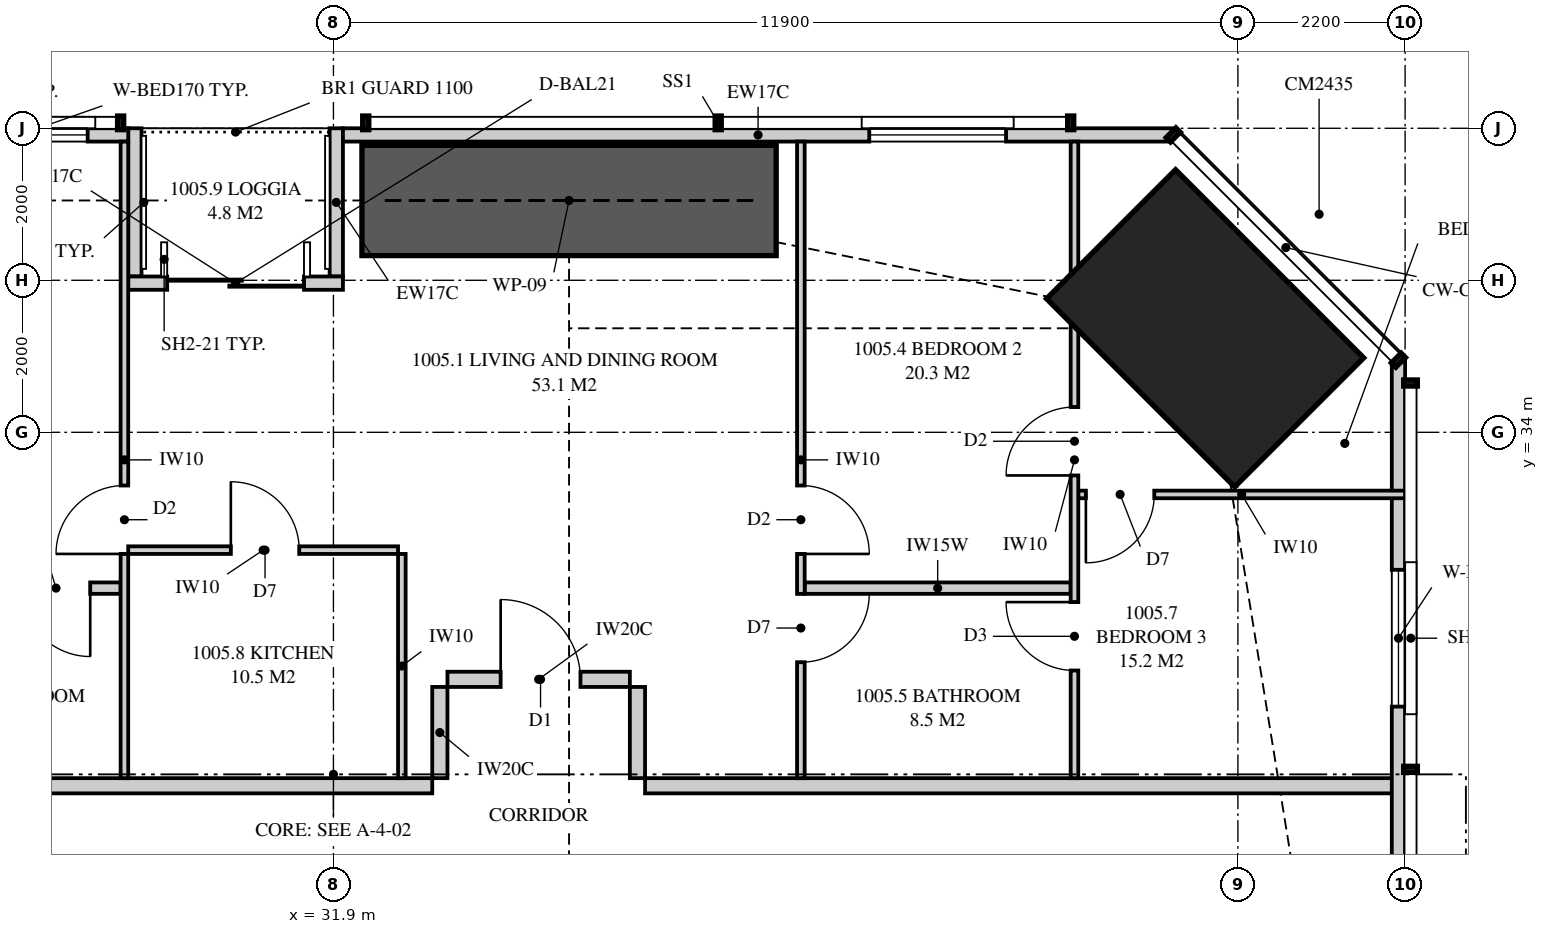
"""IFC4 building model, lengths in metres.
Left out: names, types, materials, properties, quantities, classifications, styles, units other than length and angle.
Written with IfcOpenShell. Run it as: python <this file> out.ifc"""

import sys

from ifc_helpers import new_model, si_unit, direction, frame, frame_2d, origin, origin_2d, place, context, subcontext, project, spatial, polyline, rectangle, outline, extrude, element, fill, save


model = new_model("IFC4")
c1 = context("Model", 3, precision=1e-05, world=origin(), true_north=direction((0.0, 1.0)))
c2 = subcontext(c1, "Body", "Model", "MODEL_VIEW")
j1 = project(units=[si_unit("LENGTHUNIT", "METRE"), si_unit("PLANEANGLEUNIT", "RADIAN")], contexts=[c1])
p1 = place(None, origin())
s1 = spatial("IfcSite", under=j1, at=p1, CompositionType="ELEMENT")
p2 = place(p1, origin())
s2 = spatial("IfcBuilding", under=s1, at=p2, CompositionType="ELEMENT")
p3 = place(p2, frame((0.0, 0.0, 41.1)))
s3 = spatial("IfcBuildingStorey", under=s2, at=p3, CompositionType="ELEMENT", Elevation=41.1)
p4 = place(p3, frame((43.369, 35.369, 0.0), z_axis=(0.0, 0.0, 1.0), x_axis=(-0.707106781187, -0.707106781187, 0.0)))
e1 = element("IfcColumn", 1, at=p4, inside=s3, PredefinedType="COLUMN", context=c2, shape_type="SweptSolid", body=[
    extrude(rectangle(XDim=2.4, YDim=3.5, at=origin_2d()), origin(), (0.0, 0.0, 1.0), 3.35),
])
p5 = place(p3, frame((45.913, 3.051, 0.0), z_axis=(0.0, 0.0, 1.0), x_axis=(0.0, 1.0, 0.0)))
e2 = element("IfcWall", 2, at=p5, inside=s3, PredefinedType="SOLIDWALL", context=c2, shape_type="SweptSolid", body=[
    extrude(outline(polyline([(0.0, 0.0), (31.897, 0.0), (31.897, 3.11), (22.167, 3.11), (22.167, 2.15), (22.074, 2.15), (22.074, 3.11), (21.949, 3.11), (21.949, 2.15), (9.949, 2.15), (9.949, 3.11), (9.823, 3.11), (9.823, 2.15), (9.73, 2.15), (9.73, 3.11), (0.0, 3.11), (0.0, 0.0)])), frame((0.0, 0.087, 0.0), z_axis=(0.0, -1.0, 0.0), x_axis=(1.0, 0.0, 0.0)), (0.0, 0.0, 1.0), 0.175),
])
p6 = place(p5, frame((2.257, 0.0, 0.4)))
e3 = element("IfcOpeningElement", 3, at=p6, cuts=e2, PredefinedType="OPENING", context=c2, shape_type="SweptSolid", body=[
    extrude(rectangle(XDim=1.8, YDim=1.7, at=frame_2d((0.9, 0.85))), frame((0.0, 0.097, 0.0), z_axis=(0.0, -1.0, 0.0), x_axis=(1.0, 0.0, 0.0)), (0.0, 0.0, 1.0), 0.195),
])
p7 = place(p5, frame((14.849, 0.0, 0.4)))
e4 = element("IfcOpeningElement", 4, at=p7, cuts=e2, PredefinedType="OPENING", context=c2, shape_type="SweptSolid", body=[
    extrude(rectangle(XDim=1.2, YDim=1.7, at=frame_2d((0.6, 0.85))), frame((0.0, 0.097, 0.0), z_axis=(0.0, -1.0, 0.0), x_axis=(1.0, 0.0, 0.0)), (0.0, 0.0, 1.0), 0.195),
])
p8 = place(p5, frame((27.34, 0.0, 0.4)))
e5 = element("IfcOpeningElement", 5, at=p8, cuts=e2, PredefinedType="OPENING", context=c2, shape_type="SweptSolid", body=[
    extrude(rectangle(XDim=1.8, YDim=1.7, at=frame_2d((0.9, 0.85))), frame((0.0, 0.097, 0.0), z_axis=(0.0, -1.0, 0.0), x_axis=(1.0, 0.0, 0.0)), (0.0, 0.0, 1.0), 0.195),
])
p9 = place(p3, frame((42.949, 37.913, 0.0), z_axis=(0.0, 0.0, 1.0), x_axis=(-1.0, 0.0, 0.0)))
e6 = element("IfcWall", 6, at=p9, inside=s3, PredefinedType="SOLIDWALL", context=c2, shape_type="SweptSolid", body=[
    extrude(outline(polyline([(0.0, 0.0), (10.924, 0.0), (10.924, 2.15), (7.949, 2.15), (7.949, 3.11), (7.793, 3.11), (7.793, 2.15), (7.745, 2.15), (7.745, 3.11), (0.0, 3.11), (0.0, 0.0)])), frame((0.0, 0.087, 0.0), z_axis=(0.0, -1.0, 0.0), x_axis=(1.0, 0.0, 0.0)), (0.0, 0.0, 1.0), 0.175),
])
p10 = place(p9, frame((2.199, 0.0, 0.4)))
e7 = element("IfcOpeningElement", 7, at=p10, cuts=e6, PredefinedType="OPENING", context=c2, shape_type="SweptSolid", body=[
    extrude(rectangle(XDim=1.8, YDim=1.7, at=frame_2d((0.9, 0.85))), frame((0.0, 0.097, 0.0), z_axis=(0.0, -1.0, 0.0), x_axis=(1.0, 0.0, 0.0)), (0.0, 0.0, 1.0), 0.195),
])
p11 = place(p3, frame((29.2, 37.913, 0.0), z_axis=(0.0, 0.0, 1.0), x_axis=(-1.0, 0.0, 0.0)))
e8 = element("IfcWall", 8, at=p11, inside=s3, PredefinedType="SOLIDWALL", context=c2, shape_type="SweptSolid", body=[
    extrude(rectangle(XDim=8.0, YDim=0.175, at=frame_2d((4.0, 0.0))), origin(), (0.0, 0.0, 1.0), 2.15),
])
p12 = place(p11, frame((0.534, 0.0, 0.4)))
e9 = element("IfcOpeningElement", 9, at=p12, cuts=e8, PredefinedType="OPENING", context=c2, shape_type="SweptSolid", body=[
    extrude(rectangle(XDim=1.8, YDim=1.7, at=frame_2d((0.9, 0.85))), frame((0.0, 0.097, 0.0), z_axis=(0.0, -1.0, 0.0), x_axis=(1.0, 0.0, 0.0)), (0.0, 0.0, 1.0), 0.195),
])
p13 = place(p3, frame((32.025, 35.962, 0.0), z_axis=(0.0, 0.0, 1.0), x_axis=(-1.0, 0.0, 0.0)))
e10 = element("IfcWall", 10, at=p13, inside=s3, PredefinedType="SOLIDWALL", context=c2, shape_type="SweptSolid", body=[
    extrude(rectangle(XDim=2.825, YDim=0.175, at=frame_2d((1.413, 0.0))), origin(), (0.0, 0.0, 1.0), 3.11),
])
p14 = place(p13, frame((0.512, 0.0, 0.0)))
e11 = element("IfcOpeningElement", 11, at=p14, cuts=e10, PredefinedType="OPENING", context=c2, shape_type="SweptSolid", body=[
    extrude(rectangle(XDim=1.8, YDim=2.1, at=frame_2d((0.9, 1.05))), frame((0.0, 0.097, 0.0), z_axis=(0.0, -1.0, 0.0), x_axis=(1.0, 0.0, 0.0)), (0.0, 0.0, 1.0), 0.195),
])
for number, where, z_axis, x_axis in (
    (12, (31.938, 38.0, 0.0), (0.0, 0.0, 1.0), (0.0, -1.0, 0.0)),
    (13, (29.288, 38.0, 0.0), (0.0, 0.0, 1.0), (0.0, -1.0, 0.0)),
):
    element("IfcWall", number, at=place(p3, frame(where, z_axis=z_axis, x_axis=x_axis)), inside=s3, PredefinedType="SOLIDWALL", context=c2, shape_type="SweptSolid", body=[
        extrude(outline(polyline([(0.0, 0.0), (1.95, 0.0), (1.95, 3.11), (1.75, 3.11), (1.75, 2.15), (0.15, 2.15), (0.15, 3.11), (0.0, 3.11), (0.0, 0.0)])), frame((0.0, 0.087, 0.0), z_axis=(0.0, -1.0, 0.0), x_axis=(1.0, 0.0, 0.0)), (0.0, 0.0, 1.0), 0.175),
    ])
p15 = place(p3, frame((23.3, 29.35, 0.0), z_axis=(0.0, 0.0, 1.0), x_axis=(1.0, 0.0, 0.0)))
e14 = element("IfcWall", 14, at=p15, inside=s3, PredefinedType="PARTITIONING", context=c2, shape_type="SweptSolid", body=[
    extrude(outline(polyline([(0.0, 0.0), (9.9, 0.0), (9.9, 3.11), (1.037, 3.11), (1.037, 2.541), (0.363, 2.541), (0.363, 3.11), (0.0, 3.11), (0.0, 0.0)])), frame((0.0, 0.1, 0.0), z_axis=(0.0, -1.0, 0.0), x_axis=(1.0, 0.0, 0.0)), (0.0, 0.0, 1.0), 0.2),
])
p16 = place(p3, frame((29.15, 37.825, 0.0), z_axis=(0.0, 0.0, 1.0), x_axis=(0.0, -1.0, 0.0)))
e15 = element("IfcWall", 15, at=p16, inside=s3, PredefinedType="PARTITIONING", context=c2, shape_type="SweptSolid", body=[
    extrude(outline(polyline([(0.0, 0.0), (8.375, 0.0), (8.375, 3.11), (1.635, 3.11), (1.635, 2.15), (0.0, 2.15), (0.0, 3.11), (0.0, 0.0)])), frame((0.0, 0.05, 0.0), z_axis=(0.0, -1.0, 0.0), x_axis=(1.0, 0.0, 0.0)), (0.0, 0.0, 1.0), 0.1),
])
p17 = place(p16, frame((4.525, 0.0, 0.0)))
e16 = element("IfcOpeningElement", 16, at=p17, cuts=e15, PredefinedType="OPENING", context=c2, shape_type="SweptSolid", body=[
    extrude(rectangle(XDim=0.9, YDim=2.1, at=frame_2d((0.45, 1.05))), frame((0.0, 0.06, 0.0), z_axis=(0.0, -1.0, 0.0), x_axis=(1.0, 0.0, 0.0)), (0.0, 0.0, 1.0), 0.12),
])
p18 = place(p3, frame((38.05, 37.825, 0.0), z_axis=(0.0, 0.0, 1.0), x_axis=(0.0, -1.0, 0.0)))
e17 = element("IfcWall", 17, at=p18, inside=s3, PredefinedType="PARTITIONING", context=c2, shape_type="SweptSolid", body=[
    extrude(outline(polyline([(0.0, 0.0), (8.375, 0.0), (8.375, 3.11), (3.716, 3.11), (3.716, 2.51), (2.265, 2.51), (2.265, 2.15), (0.51, 2.15), (0.51, 3.11), (0.0, 3.11), (0.0, 0.0)])), frame((0.0, 0.05, 0.0), z_axis=(0.0, -1.0, 0.0), x_axis=(1.0, 0.0, 0.0)), (0.0, 0.0, 1.0), 0.1),
])
p19 = place(p18, frame((4.525, 0.0, 0.0)))
e18 = element("IfcOpeningElement", 18, at=p19, cuts=e17, PredefinedType="OPENING", context=c2, shape_type="SweptSolid", body=[
    extrude(rectangle(XDim=0.9, YDim=2.1, at=frame_2d((0.45, 1.05))), frame((0.0, 0.06, 0.0), z_axis=(0.0, -1.0, 0.0), x_axis=(1.0, 0.0, 0.0)), (0.0, 0.0, 1.0), 0.12),
])
p20 = place(p18, frame((5.95, 0.0, 0.0)))
e19 = element("IfcOpeningElement", 19, at=p20, cuts=e17, PredefinedType="OPENING", context=c2, shape_type="SweptSolid", body=[
    extrude(rectangle(XDim=0.9, YDim=2.1, at=frame_2d((0.45, 1.05))), frame((0.0, 0.06, 0.0), z_axis=(0.0, -1.0, 0.0), x_axis=(1.0, 0.0, 0.0)), (0.0, 0.0, 1.0), 0.12),
])
p21 = place(p3, frame((41.65, 37.825, 0.0), z_axis=(0.0, 0.0, 1.0), x_axis=(0.0, -1.0, 0.0)))
e20 = element("IfcWall", 20, at=p21, inside=s3, PredefinedType="PARTITIONING", context=c2, shape_type="SweptSolid", body=[
    extrude(outline(polyline([(0.0, 0.0), (8.375, 0.0), (8.375, 3.11), (3.716, 3.11), (3.716, 2.51), (2.937, 2.51), (2.937, 2.15), (1.285, 2.15), (1.285, 2.51), (1.196, 2.51), (1.196, 3.11), (0.0, 3.11), (0.0, 0.0)])), frame((0.0, 0.05, 0.0), z_axis=(0.0, -1.0, 0.0), x_axis=(1.0, 0.0, 0.0)), (0.0, 0.0, 1.0), 0.1),
])
p22 = place(p21, frame((3.492, 0.0, 0.0)))
e21 = element("IfcOpeningElement", 21, at=p22, cuts=e20, PredefinedType="OPENING", context=c2, shape_type="SweptSolid", body=[
    extrude(rectangle(XDim=0.9, YDim=2.1, at=frame_2d((0.45, 1.05))), frame((0.0, 0.06, 0.0), z_axis=(0.0, -1.0, 0.0), x_axis=(1.0, 0.0, 0.0)), (0.0, 0.0, 1.0), 0.12),
])
p23 = place(p21, frame((6.059, 0.0, 0.0)))
e22 = element("IfcOpeningElement", 22, at=p23, cuts=e20, PredefinedType="OPENING", context=c2, shape_type="SweptSolid", body=[
    extrude(rectangle(XDim=0.9, YDim=2.1, at=frame_2d((0.45, 1.05))), frame((0.0, 0.06, 0.0), z_axis=(0.0, -1.0, 0.0), x_axis=(1.0, 0.0, 0.0)), (0.0, 0.0, 1.0), 0.12),
])
p24 = place(p3, frame((23.3, 31.95, 0.0), z_axis=(0.0, 0.0, 1.0), x_axis=(1.0, 0.0, 0.0)))
e23 = element("IfcWall", 23, at=p24, inside=s3, PredefinedType="PLUMBINGWALL", context=c2, shape_type="SweptSolid", body=[
    extrude(outline(polyline([(0.0, 0.0), (5.8, 0.0), (5.8, 3.11), (1.012, 3.11), (1.012, 2.541), (0.388, 2.541), (0.388, 3.11), (0.0, 3.11), (0.0, 0.0)])), frame((0.0, 0.075, 0.0), z_axis=(0.0, -1.0, 0.0), x_axis=(1.0, 0.0, 0.0)), (0.0, 0.0, 1.0), 0.15),
])
p25 = place(p24, frame((4.5, 0.0, 0.0)))
e24 = element("IfcOpeningElement", 24, at=p25, cuts=e23, PredefinedType="OPENING", context=c2, shape_type="SweptSolid", body=[
    extrude(rectangle(XDim=0.9, YDim=2.1, at=frame_2d((0.45, 1.05))), frame((0.0, 0.085, 0.0), z_axis=(0.0, -1.0, 0.0), x_axis=(1.0, 0.0, 0.0)), (0.0, 0.0, 1.0), 0.17),
])
p26 = place(p3, frame((38.1, 31.95, 0.0), z_axis=(0.0, 0.0, 1.0), x_axis=(1.0, 0.0, 0.0)))
e25 = element("IfcWall", 25, at=p26, inside=s3, PredefinedType="PLUMBINGWALL", context=c2, shape_type="SweptSolid", body=[
    extrude(rectangle(XDim=3.5, YDim=0.15, at=frame_2d((1.75, 0.0))), origin(), (0.0, 0.0, 1.0), 3.11),
])
p27 = place(p3, frame((41.7, 33.183, 0.0), z_axis=(0.0, 0.0, 1.0), x_axis=(1.0, 0.0, 0.0)))
e26 = element("IfcWall", 26, at=p27, inside=s3, PredefinedType="PARTITIONING", context=c2, shape_type="SweptSolid", body=[
    extrude(outline(polyline([(0.0, 0.0), (4.3, 0.0), (4.3, 3.11), (2.894, 3.11), (2.894, 2.15), (1.152, 2.15), (1.152, 3.11), (0.0, 3.11), (0.0, 0.0)])), frame((0.0, 0.05, 0.0), z_axis=(0.0, -1.0, 0.0), x_axis=(1.0, 0.0, 0.0)), (0.0, 0.0, 1.0), 0.1),
])
p28 = place(p27, frame((0.1, 0.0, 0.0)))
e27 = element("IfcOpeningElement", 27, at=p28, cuts=e26, PredefinedType="OPENING", context=c2, shape_type="SweptSolid", body=[
    extrude(rectangle(XDim=0.9, YDim=2.1, at=frame_2d((0.45, 1.05))), frame((0.0, 0.06, 0.0), z_axis=(0.0, -1.0, 0.0), x_axis=(1.0, 0.0, 0.0)), (0.0, 0.0, 1.0), 0.12),
])
p29 = place(p3, frame((29.2, 32.45, 0.0), z_axis=(0.0, 0.0, 1.0), x_axis=(1.0, 0.0, 0.0)))
e28 = element("IfcWall", 28, at=p29, inside=s3, PredefinedType="PARTITIONING", context=c2, shape_type="SweptSolid", body=[
    extrude(rectangle(XDim=3.55, YDim=0.1, at=frame_2d((1.775, 0.0))), origin(), (0.0, 0.0, 1.0), 3.11),
])
p30 = place(p29, frame((1.35, 0.0, 0.0)))
e29 = element("IfcOpeningElement", 29, at=p30, cuts=e28, PredefinedType="OPENING", context=c2, shape_type="SweptSolid", body=[
    extrude(rectangle(XDim=0.9, YDim=2.1, at=frame_2d((0.45, 1.05))), frame((0.0, 0.06, 0.0), z_axis=(0.0, -1.0, 0.0), x_axis=(1.0, 0.0, 0.0)), (0.0, 0.0, 1.0), 0.12),
])
p31 = place(p3, frame((32.8, 32.4, 0.0), z_axis=(0.0, 0.0, 1.0), x_axis=(0.0, -1.0, 0.0)))
e30 = element("IfcWall", 30, at=p31, inside=s3, PredefinedType="PARTITIONING", context=c2, shape_type="SweptSolid", body=[
    extrude(rectangle(XDim=2.95, YDim=0.1, at=frame_2d((1.475, 0.0))), origin(), (0.0, 0.0, 1.0), 3.11),
])
p32 = place(p3, frame((36.0, 29.35, 0.0), z_axis=(0.0, 0.0, 1.0), x_axis=(1.0, 0.0, 0.0)))
e31 = element("IfcWall", 31, at=p32, inside=s3, PredefinedType="PARTITIONING", context=c2, shape_type="SweptSolid", body=[
    extrude(outline(polyline([(0.0, 0.0), (10.0, 0.0), (10.0, 3.11), (9.267, 3.11), (9.267, 2.15), (7.423, 2.15), (7.423, 3.11), (0.0, 3.11), (0.0, 0.0)])), frame((0.0, 0.1, 0.0), z_axis=(0.0, -1.0, 0.0), x_axis=(1.0, 0.0, 0.0)), (0.0, 0.0, 1.0), 0.2),
])
p33 = place(p3, frame((33.4, 30.75, 0.0), z_axis=(0.0, 0.0, 1.0), x_axis=(1.0, 0.0, 0.0)))
e32 = element("IfcWall", 32, at=p33, inside=s3, PredefinedType="PARTITIONING", context=c2, shape_type="SweptSolid", body=[
    extrude(outline(polyline([(0.0, 0.0), (2.4, 0.0), (2.4, 3.11), (1.938, 3.11), (1.938, 2.541), (1.263, 2.541), (1.263, 3.11), (0.0, 3.11), (0.0, 0.0)])), frame((0.0, 0.1, 0.0), z_axis=(0.0, -1.0, 0.0), x_axis=(1.0, 0.0, 0.0)), (0.0, 0.0, 1.0), 0.2),
])
p34 = place(p33, frame((0.7, 0.0, 0.0)))
e33 = element("IfcOpeningElement", 33, at=p34, cuts=e32, PredefinedType="OPENING", context=c2, shape_type="SweptSolid", body=[
    extrude(rectangle(XDim=1.05, YDim=2.2, at=frame_2d((0.525, 1.1))), frame((0.0, 0.11, 0.0), z_axis=(0.0, -1.0, 0.0), x_axis=(1.0, 0.0, 0.0)), (0.0, 0.0, 1.0), 0.22),
])
for number, where, z_axis, x_axis in (
    (34, (33.3, 29.45, 0.0), (0.0, 0.0, 1.0), (0.0, 1.0, 0.0)),
    (35, (35.9, 29.45, 0.0), (0.0, 0.0, 1.0), (0.0, 1.0, 0.0)),
):
    element("IfcWall", number, at=place(p3, frame(where, z_axis=z_axis, x_axis=x_axis)), inside=s3, PredefinedType="PARTITIONING", context=c2, shape_type="SweptSolid", body=[
        extrude(rectangle(XDim=1.2, YDim=0.2, at=frame_2d((0.6, 0.0))), origin(), (0.0, 0.0, 1.0), 3.11),
    ])
p35 = place(p3, frame((32.275, 37.05, 0.0), z_axis=(0.0, 0.0, 1.0), x_axis=(1.0, 0.0, 0.0)))
e36 = element("IfcWall", 36, at=p35, inside=s3, PredefinedType="SHEAR", context=c2, shape_type="SweptSolid", body=[
    extrude(rectangle(XDim=5.45, YDim=1.45, at=frame_2d((2.725, 0.0))), origin(), (0.0, 0.0, 1.0), 3.35),
])
p36 = place(p8, origin())
e37 = element("IfcWindow", 37, at=p36, inside=s3, PartitioningType="SINGLE_PANEL", PredefinedType="WINDOW", context=c2, shape_type="SweptSolid", body=[
    extrude(rectangle(XDim=1.8, YDim=1.7, at=frame_2d((0.9, 0.85))), frame((0.0, 0.03, 0.0), z_axis=(0.0, -1.0, 0.0), x_axis=(1.0, 0.0, 0.0)), (0.0, 0.0, 1.0), 0.06),
])
fill(e5, e37)
p37 = place(p10, origin())
e38 = element("IfcWindow", 38, at=p37, inside=s3, PartitioningType="SINGLE_PANEL", PredefinedType="WINDOW", context=c2, shape_type="SweptSolid", body=[
    extrude(rectangle(XDim=1.8, YDim=1.7, at=frame_2d((0.9, 0.85))), frame((0.0, 0.03, 0.0), z_axis=(0.0, -1.0, 0.0), x_axis=(1.0, 0.0, 0.0)), (0.0, 0.0, 1.0), 0.06),
])
fill(e7, e38)
p38 = place(p14, origin())
e39 = element("IfcDoor", 39, at=p38, inside=s3, OperationType="SLIDING_TO_LEFT", PredefinedType="DOOR", context=c2, shape_type="SweptSolid", body=[
    extrude(rectangle(XDim=1.8, YDim=2.1, at=frame_2d((0.9, 1.05))), frame((0.0, 0.025, 0.0), z_axis=(0.0, -1.0, 0.0), x_axis=(1.0, 0.0, 0.0)), (0.0, 0.0, 1.0), 0.05),
])
fill(e11, e39)
p39 = place(p12, origin())
e40 = element("IfcWindow", 40, at=p39, inside=s3, PartitioningType="SINGLE_PANEL", PredefinedType="WINDOW", context=c2, shape_type="SweptSolid", body=[
    extrude(rectangle(XDim=1.8, YDim=1.7, at=frame_2d((0.9, 0.85))), frame((0.0, 0.03, 0.0), z_axis=(0.0, -1.0, 0.0), x_axis=(1.0, 0.0, 0.0)), (0.0, 0.0, 1.0), 0.06),
])
fill(e9, e40)
p40 = place(p34, origin())
e41 = element("IfcDoor", 41, at=p40, inside=s3, OperationType="SINGLE_SWING_LEFT", PredefinedType="DOOR", context=c2, shape_type="SweptSolid", body=[
    extrude(rectangle(XDim=1.05, YDim=2.2, at=frame_2d((0.525, 1.1))), frame((0.0, 0.025, 0.0), z_axis=(0.0, -1.0, 0.0), x_axis=(1.0, 0.0, 0.0)), (0.0, 0.0, 1.0), 0.05),
])
fill(e33, e41)
p41 = place(p17, frame((0.9, 0.0, 0.0), z_axis=(0.0, 0.0, 1.0), x_axis=(-1.0, 0.0, 0.0)))
e42 = element("IfcDoor", 42, at=p41, inside=s3, OperationType="SINGLE_SWING_LEFT", PredefinedType="DOOR", context=c2, shape_type="SweptSolid", body=[
    extrude(rectangle(XDim=0.9, YDim=2.1, at=frame_2d((0.45, 1.05))), frame((0.0, 0.025, 0.0), z_axis=(0.0, -1.0, 0.0), x_axis=(1.0, 0.0, 0.0)), (0.0, 0.0, 1.0), 0.05),
])
fill(e16, e42)
p42 = place(p25, frame((0.9, 0.0, 0.0), z_axis=(0.0, 0.0, 1.0), x_axis=(-1.0, 0.0, 0.0)))
e43 = element("IfcDoor", 43, at=p42, inside=s3, OperationType="SINGLE_SWING_LEFT", PredefinedType="DOOR", context=c2, shape_type="SweptSolid", body=[
    extrude(rectangle(XDim=0.9, YDim=2.1, at=frame_2d((0.45, 1.05))), frame((0.0, 0.025, 0.0), z_axis=(0.0, -1.0, 0.0), x_axis=(1.0, 0.0, 0.0)), (0.0, 0.0, 1.0), 0.05),
])
fill(e24, e43)
p43 = place(p19, origin())
e44 = element("IfcDoor", 44, at=p43, inside=s3, OperationType="SINGLE_SWING_RIGHT", PredefinedType="DOOR", context=c2, shape_type="SweptSolid", body=[
    extrude(rectangle(XDim=0.9, YDim=2.1, at=frame_2d((0.45, 1.05))), frame((0.0, 0.025, 0.0), z_axis=(0.0, -1.0, 0.0), x_axis=(1.0, 0.0, 0.0)), (0.0, 0.0, 1.0), 0.05),
])
fill(e18, e44)
p44 = place(p20, origin())
e45 = element("IfcDoor", 45, at=p44, inside=s3, OperationType="SINGLE_SWING_LEFT", PredefinedType="DOOR", context=c2, shape_type="SweptSolid", body=[
    extrude(rectangle(XDim=0.9, YDim=2.1, at=frame_2d((0.45, 1.05))), frame((0.0, 0.025, 0.0), z_axis=(0.0, -1.0, 0.0), x_axis=(1.0, 0.0, 0.0)), (0.0, 0.0, 1.0), 0.05),
])
fill(e19, e45)
p45 = place(p28, frame((0.9, 0.0, 0.0), z_axis=(0.0, 0.0, 1.0), x_axis=(-1.0, 0.0, 0.0)))
e46 = element("IfcDoor", 46, at=p45, inside=s3, OperationType="SINGLE_SWING_RIGHT", PredefinedType="DOOR", context=c2, shape_type="SweptSolid", body=[
    extrude(rectangle(XDim=0.9, YDim=2.1, at=frame_2d((0.45, 1.05))), frame((0.0, 0.025, 0.0), z_axis=(0.0, -1.0, 0.0), x_axis=(1.0, 0.0, 0.0)), (0.0, 0.0, 1.0), 0.05),
])
fill(e27, e46)
p46 = place(p22, frame((0.9, 0.0, 0.0), z_axis=(0.0, 0.0, 1.0), x_axis=(-1.0, 0.0, 0.0)))
e47 = element("IfcDoor", 47, at=p46, inside=s3, OperationType="SINGLE_SWING_LEFT", PredefinedType="DOOR", context=c2, shape_type="SweptSolid", body=[
    extrude(rectangle(XDim=0.9, YDim=2.1, at=frame_2d((0.45, 1.05))), frame((0.0, 0.025, 0.0), z_axis=(0.0, -1.0, 0.0), x_axis=(1.0, 0.0, 0.0)), (0.0, 0.0, 1.0), 0.05),
])
fill(e21, e47)
p47 = place(p23, frame((0.9, 0.0, 0.0), z_axis=(0.0, 0.0, 1.0), x_axis=(-1.0, 0.0, 0.0)))
e48 = element("IfcDoor", 48, at=p47, inside=s3, OperationType="SINGLE_SWING_RIGHT", PredefinedType="DOOR", context=c2, shape_type="SweptSolid", body=[
    extrude(rectangle(XDim=0.9, YDim=2.1, at=frame_2d((0.45, 1.05))), frame((0.0, 0.025, 0.0), z_axis=(0.0, -1.0, 0.0), x_axis=(1.0, 0.0, 0.0)), (0.0, 0.0, 1.0), 0.05),
])
fill(e22, e48)
p48 = place(p30, origin())
e49 = element("IfcDoor", 49, at=p48, inside=s3, OperationType="SINGLE_SWING_LEFT", PredefinedType="DOOR", context=c2, shape_type="SweptSolid", body=[
    extrude(rectangle(XDim=0.9, YDim=2.1, at=frame_2d((0.45, 1.05))), frame((0.0, 0.025, 0.0), z_axis=(0.0, -1.0, 0.0), x_axis=(1.0, 0.0, 0.0)), (0.0, 0.0, 1.0), 0.05),
])
fill(e29, e49)
save(model, sys.argv[1])
